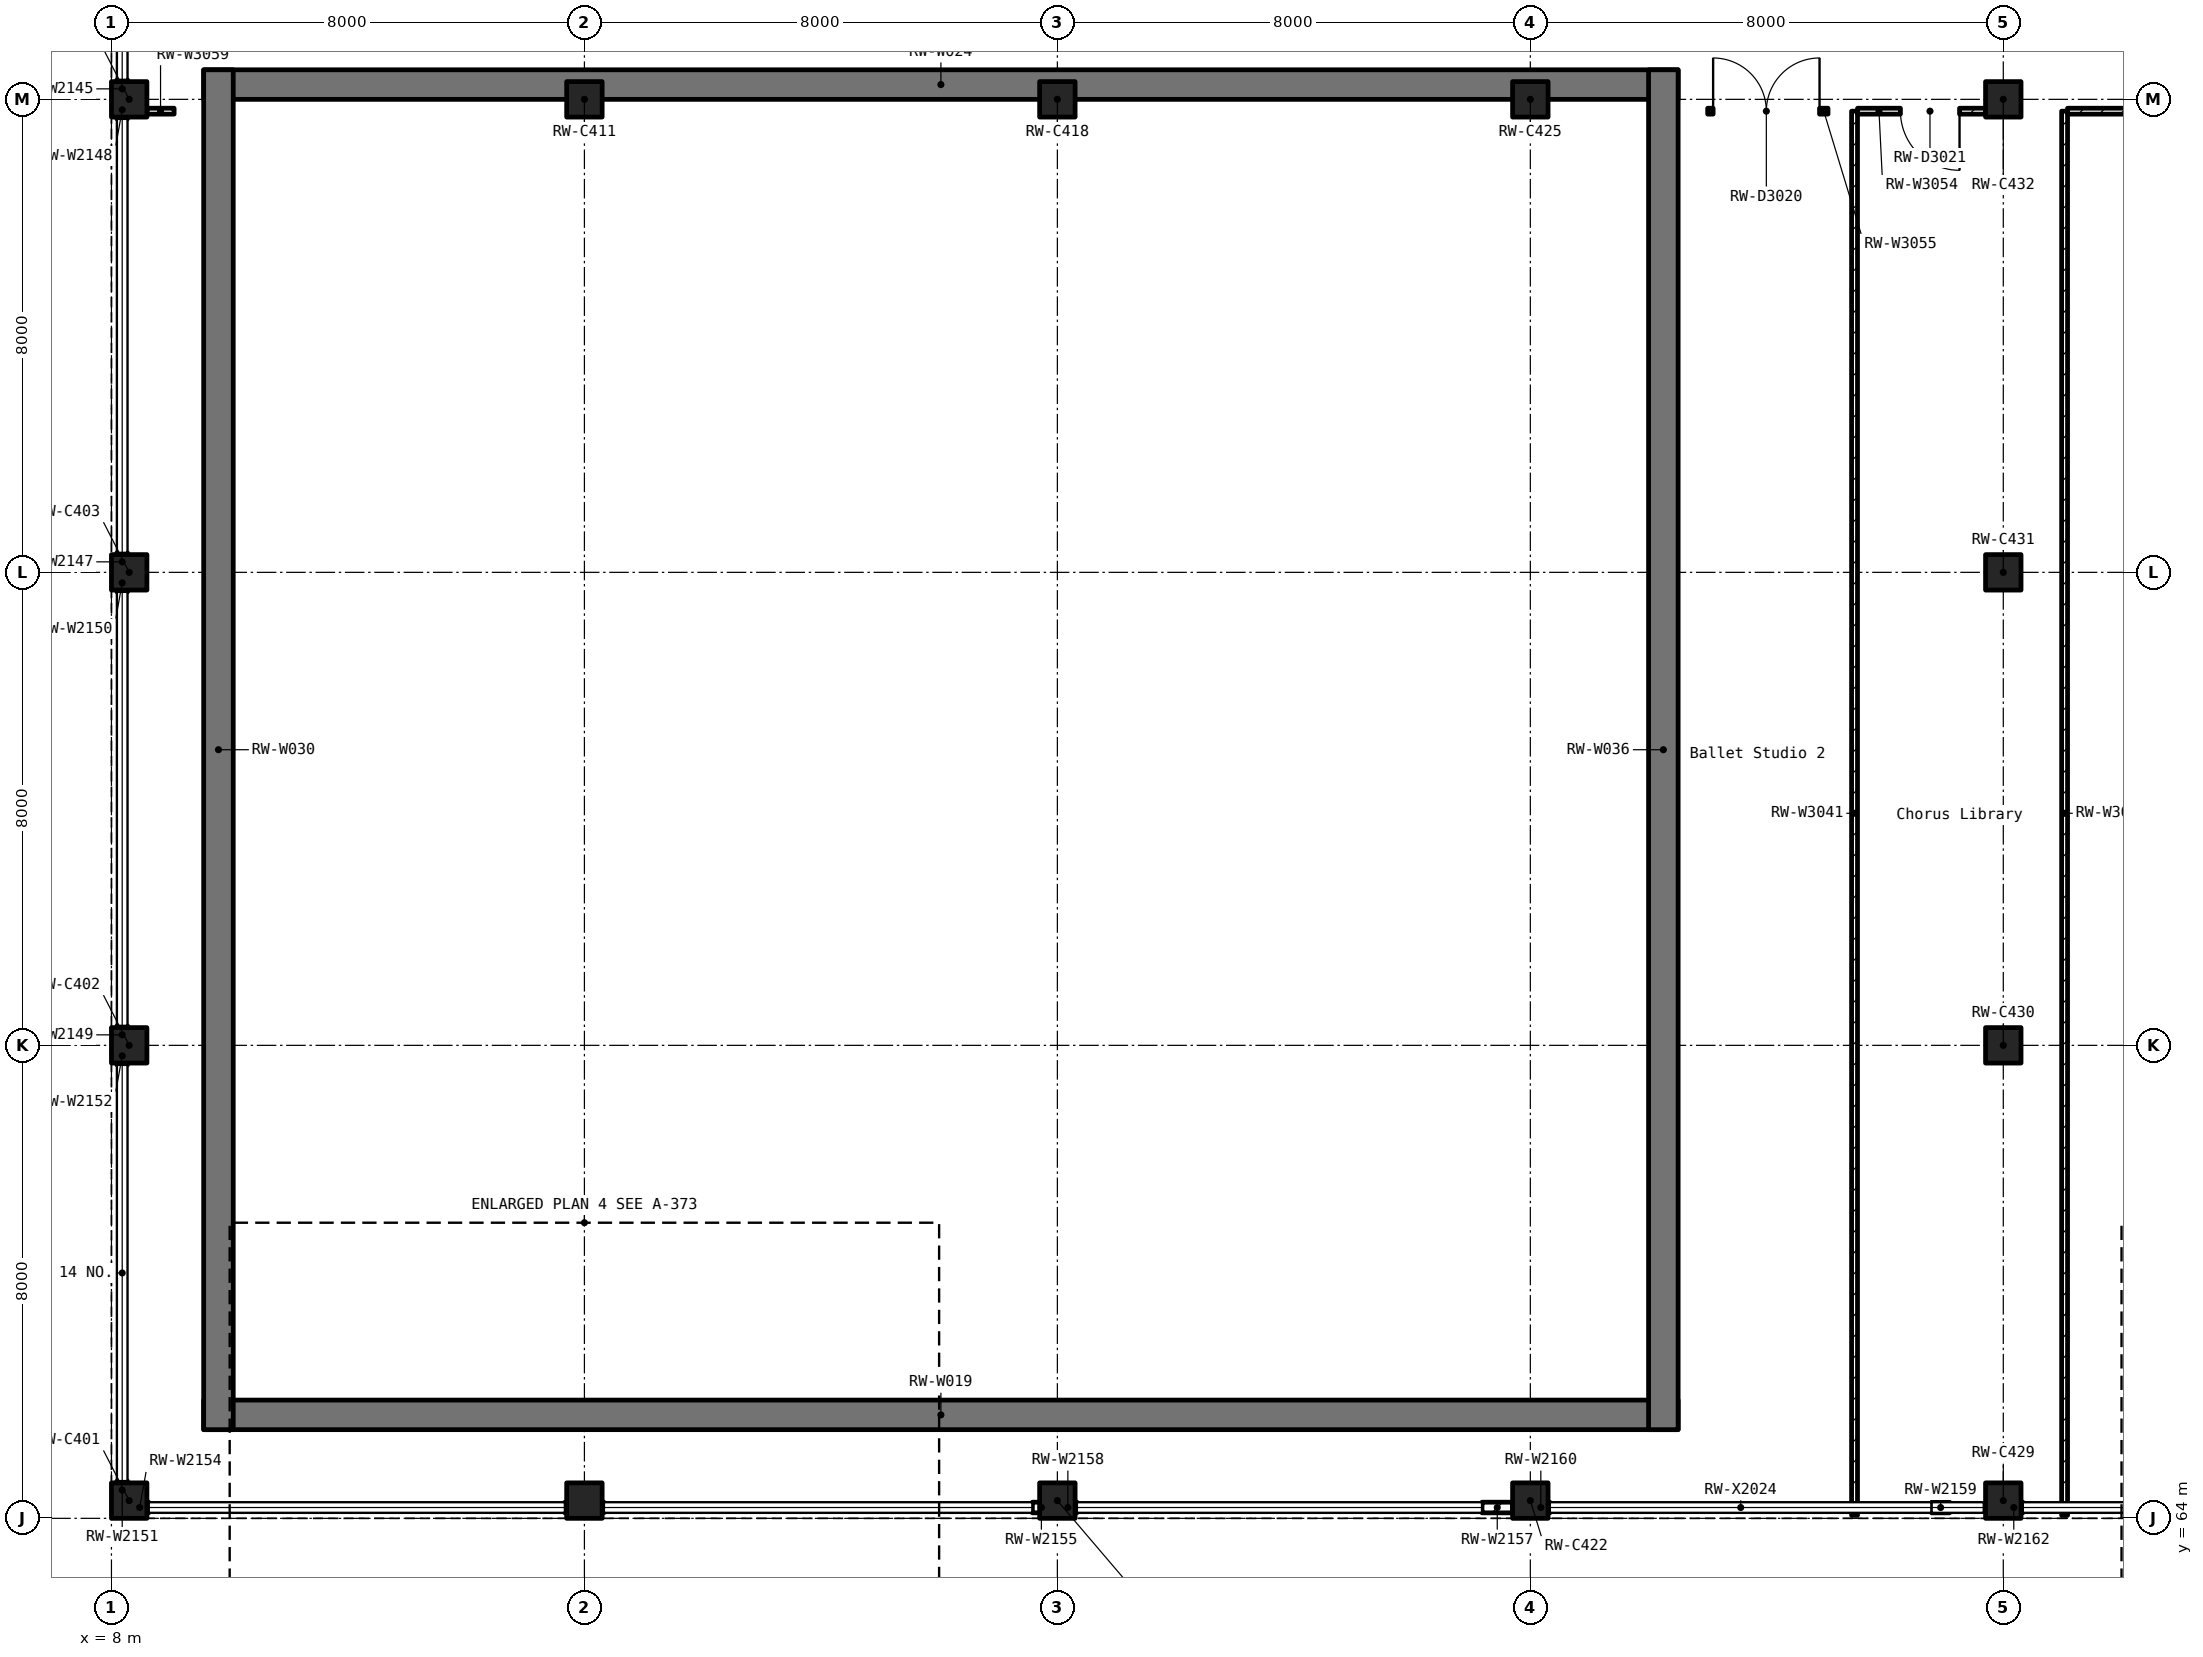
"""IFC4 building model, lengths in metres.
Left out: names, types, materials, properties, quantities, classifications, styles, units other than length and angle.
Written with IfcOpenShell. Run it as: python <this file> out.ifc"""

import sys

from ifc_helpers import new_model, si_unit, direction, frame, frame_2d, origin, origin_2d, place, context, subcontext, project, spatial, rectangle, extrude, element, fill, save


model = new_model("IFC4")
c1 = context("Model", 3, precision=1e-05, world=origin(), true_north=direction((0.0, 1.0)))
c2 = subcontext(c1, "Body", "Model", "MODEL_VIEW")
j1 = project(units=[si_unit("LENGTHUNIT", "METRE"), si_unit("PLANEANGLEUNIT", "RADIAN")], contexts=[c1])
p1 = place(None, origin())
s1 = spatial("IfcSite", under=j1, at=p1, CompositionType="ELEMENT")
p2 = place(p1, origin())
s2 = spatial("IfcBuilding", under=s1, at=p2, CompositionType="ELEMENT")
p3 = place(p2, frame((0.0, 0.0, 6.0)))
s3 = spatial("IfcBuildingStorey", under=s2, at=p3, CompositionType="ELEMENT", Elevation=6.0)
for number, where, z_axis, x_axis in (
    (1, (8.3, 64.3, 0.0), (0.0, 0.0, 1.0), (1.0, 0.0, 0.0)),
    (2, (8.3, 72.0, 0.0), (0.0, 0.0, 1.0), (1.0, 0.0, 0.0)),
    (3, (8.3, 80.0, 0.0), (0.0, 0.0, 1.0), (1.0, 0.0, 0.0)),
    (4, (8.3, 88.0, 0.0), (0.0, 0.0, 1.0), (1.0, 0.0, 0.0)),
    (5, (16.0, 64.3, 0.0), (0.0, 0.0, 1.0), (1.0, 0.0, 0.0)),
    (6, (16.0, 88.0, 0.0), (0.0, 0.0, 1.0), (1.0, 0.0, 0.0)),
    (7, (24.0, 64.3, 0.0), (0.0, 0.0, 1.0), (1.0, 0.0, 0.0)),
    (8, (24.0, 88.0, 0.0), (0.0, 0.0, 1.0), (1.0, 0.0, 0.0)),
    (9, (32.0, 64.3, 0.0), (0.0, 0.0, 1.0), (1.0, 0.0, 0.0)),
    (10, (32.0, 88.0, 0.0), (0.0, 0.0, 1.0), (1.0, 0.0, 0.0)),
    (11, (40.0, 64.3, 0.0), (0.0, 0.0, 1.0), (1.0, 0.0, 0.0)),
    (12, (40.0, 72.0, 0.0), (0.0, 0.0, 1.0), (1.0, 0.0, 0.0)),
    (13, (40.0, 80.0, 0.0), (0.0, 0.0, 1.0), (1.0, 0.0, 0.0)),
    (14, (40.0, 88.0, 0.0), (0.0, 0.0, 1.0), (1.0, 0.0, 0.0)),
):
    element("IfcColumn", number, at=place(p3, frame(where, z_axis=z_axis, x_axis=x_axis)), inside=s3, PredefinedType="COLUMN", context=c2, shape_type="SweptSolid", body=[
        extrude(rectangle(XDim=0.6, YDim=0.6, at=origin_2d()), origin(), (0.0, 0.0, 1.0), 5.5),
    ])
for number, where, z_axis, x_axis in (
    (15, (9.56, 65.75, 0.0), (0.0, 0.0, 1.0), (1.0, 0.0, 0.0)),
    (16, (9.56, 88.25, 0.0), (0.0, 0.0, 1.0), (1.0, 0.0, 0.0)),
):
    element("IfcWall", number, at=place(p3, frame(where, z_axis=z_axis, x_axis=x_axis)), inside=s3, PredefinedType="SHEAR", context=c2, shape_type="SweptSolid", body=[
        extrude(rectangle(XDim=24.94, YDim=0.5, at=frame_2d((12.47, 0.0))), origin(), (0.0, 0.0, 1.0), 5.5),
    ])
for number, where, z_axis, x_axis in (
    (17, (9.81, 65.5, 0.0), (0.0, 0.0, 1.0), (0.0, 1.0, 0.0)),
    (18, (34.25, 65.5, 0.0), (0.0, 0.0, 1.0), (0.0, 1.0, 0.0)),
):
    element("IfcWall", number, at=place(p3, frame(where, z_axis=z_axis, x_axis=x_axis)), inside=s3, PredefinedType="SHEAR", context=c2, shape_type="SweptSolid", body=[
        extrude(rectangle(XDim=23.0, YDim=0.5, at=frame_2d((11.5, 0.0))), origin(), (0.0, 0.0, 1.0), 5.5),
    ])
for number, where, z_axis, x_axis in (
    (19, (37.484, 87.8, 0.0), (0.0, 0.0, 1.0), (0.0, -1.0, 0.0)),
    (20, (41.037, 64.05, 0.0), (0.0, 0.0, 1.0), (0.0, 1.0, 0.0)),
):
    element("IfcWall", number, at=place(p3, frame(where, z_axis=z_axis, x_axis=x_axis)), inside=s3, PredefinedType="PARTITIONING", context=c2, shape_type="SweptSolid", body=[
        extrude(rectangle(XDim=23.75, YDim=0.1, at=frame_2d((11.875, 0.0))), origin(), (0.0, 0.0, 1.0), 4.45),
    ])
p4 = place(p3, frame((41.087, 87.8, 0.0), z_axis=(0.0, 0.0, 1.0), x_axis=(1.0, 0.0, 0.0)))
e21 = element("IfcWall", 21, at=p4, inside=s3, PredefinedType="PARTITIONING", context=c2, shape_type="SweptSolid", body=[
    extrude(rectangle(XDim=6.613, YDim=0.1, at=frame_2d((3.307, 0.0))), origin(), (0.0, 0.0, 1.0), 4.45),
])
p5 = place(p4, frame((4.002, 0.0, 0.0)))
e22 = element("IfcOpeningElement", 22, at=p5, cuts=e21, PredefinedType="OPENING", context=c2, shape_type="SweptSolid", body=[
    extrude(rectangle(XDim=1.8, YDim=2.1, at=frame_2d((0.9, 1.05))), frame((0.0, 0.062, 0.0), z_axis=(0.0, -1.0, 0.0), x_axis=(1.0, 0.0, 0.0)), (0.0, 0.0, 1.0), 0.124),
])
p6 = place(p3, frame((39.7, 87.8, 0.0), z_axis=(0.0, 0.0, 1.0), x_axis=(-1.0, 0.0, 0.0)))
e23 = element("IfcWall", 23, at=p6, inside=s3, PredefinedType="PARTITIONING", context=c2, shape_type="SweptSolid", body=[
    extrude(rectangle(XDim=2.165, YDim=0.1, at=frame_2d((1.083, 0.0))), origin(), (0.0, 0.0, 1.0), 4.45),
])
p7 = place(p6, frame((0.44, 0.0, 0.0)))
e24 = element("IfcOpeningElement", 24, at=p7, cuts=e23, PredefinedType="OPENING", context=c2, shape_type="SweptSolid", body=[
    extrude(rectangle(XDim=1.0, YDim=2.1, at=frame_2d((0.5, 1.05))), frame((0.0, 0.062, 0.0), z_axis=(0.0, -1.0, 0.0), x_axis=(1.0, 0.0, 0.0)), (0.0, 0.0, 1.0), 0.124),
])
p8 = place(p3, frame((35.0, 87.8, 0.0), z_axis=(0.0, 0.0, 1.0), x_axis=(1.0, 0.0, 0.0)))
e25 = element("IfcWall", 25, at=p8, inside=s3, PredefinedType="PARTITIONING", context=c2, shape_type="SweptSolid", body=[
    extrude(rectangle(XDim=2.035, YDim=0.1, at=frame_2d((1.018, 0.0))), origin(), (0.0, 0.0, 1.0), 4.45),
])
p9 = place(p8, frame((0.092, 0.0, 0.0)))
e26 = element("IfcOpeningElement", 26, at=p9, cuts=e25, PredefinedType="OPENING", context=c2, shape_type="SweptSolid", body=[
    extrude(rectangle(XDim=1.8, YDim=2.1, at=frame_2d((0.9, 1.05))), frame((0.0, 0.062, 0.0), z_axis=(0.0, -1.0, 0.0), x_axis=(1.0, 0.0, 0.0)), (0.0, 0.0, 1.0), 0.124),
])
p10 = place(p3, frame((8.601, 87.8, 0.0), z_axis=(0.0, 0.0, 1.0), x_axis=(1.0, 0.0, 0.0)))
e27 = element("IfcWall", 27, at=p10, inside=s3, PredefinedType="PARTITIONING", context=c2, shape_type="SweptSolid", body=[
    extrude(rectangle(XDim=0.459, YDim=0.1, at=frame_2d((0.229, 0.0))), origin(), (0.0, 0.0, 1.0), 4.45),
])
for number, where, z_axis, x_axis in (
    (28, (8.182, 88.33, 0.0), (0.0, 0.0, 1.0), (0.0, -1.0, 0.0)),
    (29, (8.182, 80.33, 0.0), (0.0, 0.0, 1.0), (0.0, -1.0, 0.0)),
    (30, (8.182, 87.67, 0.0), (0.0, 0.0, 1.0), (0.0, 1.0, 0.0)),
    (31, (8.182, 72.33, 0.0), (0.0, 0.0, 1.0), (0.0, -1.0, 0.0)),
    (32, (8.182, 79.67, 0.0), (0.0, 0.0, 1.0), (0.0, 1.0, 0.0)),
):
    element("IfcWall", number, at=place(p3, frame(where, z_axis=z_axis, x_axis=x_axis)), inside=s3, PredefinedType="SOLIDWALL", context=c2, shape_type="SweptSolid", body=[
        extrude(rectangle(XDim=0.305, YDim=0.18, at=frame_2d((0.153, 0.0))), origin(), (0.0, 0.0, 1.0), 3.7),
    ])
p11 = place(p3, frame((8.182, 64.63, 0.0), z_axis=(0.0, 0.0, 1.0), x_axis=(0.0, -1.0, 0.0)))
e33 = element("IfcWall", 33, at=p11, inside=s3, PredefinedType="SOLIDWALL", context=c2, shape_type="SweptSolid", body=[
    extrude(rectangle(XDim=0.305, YDim=0.18, at=frame_2d((0.152, 0.0))), origin(), (0.0, 0.0, 1.0), 3.7),
])
for number, where, z_axis, x_axis in (
    (34, (8.182, 71.67, 0.0), (0.0, 0.0, 1.0), (0.0, 1.0, 0.0)),
    (35, (15.67, 64.183, 0.0), (0.0, 0.0, 1.0), (1.0, 0.0, 0.0)),
):
    element("IfcWall", number, at=place(p3, frame(where, z_axis=z_axis, x_axis=x_axis)), inside=s3, PredefinedType="SOLIDWALL", context=c2, shape_type="SweptSolid", body=[
        extrude(rectangle(XDim=0.305, YDim=0.18, at=frame_2d((0.153, 0.0))), origin(), (0.0, 0.0, 1.0), 3.7),
    ])
p12 = place(p3, frame((8.63, 64.183, 0.0), z_axis=(0.0, 0.0, 1.0), x_axis=(-1.0, 0.0, 0.0)))
e36 = element("IfcWall", 36, at=p12, inside=s3, PredefinedType="SOLIDWALL", context=c2, shape_type="SweptSolid", body=[
    extrude(rectangle(XDim=0.305, YDim=0.18, at=frame_2d((0.152, 0.0))), origin(), (0.0, 0.0, 1.0), 3.7),
])
for number, where, z_axis, x_axis in (
    (37, (23.577, 64.183, 0.0), (0.0, 0.0, 1.0), (1.0, 0.0, 0.0)),
    (38, (16.33, 64.183, 0.0), (0.0, 0.0, 1.0), (-1.0, 0.0, 0.0)),
):
    element("IfcWall", number, at=place(p3, frame(where, z_axis=z_axis, x_axis=x_axis)), inside=s3, PredefinedType="SOLIDWALL", context=c2, shape_type="SweptSolid", body=[
        extrude(rectangle(XDim=0.305, YDim=0.18, at=frame_2d((0.153, 0.0))), origin(), (0.0, 0.0, 1.0), 3.7),
    ])
p13 = place(p3, frame((31.183, 64.183, 0.0), z_axis=(0.0, 0.0, 1.0), x_axis=(1.0, 0.0, 0.0)))
e39 = element("IfcWall", 39, at=p13, inside=s3, PredefinedType="SOLIDWALL", context=c2, shape_type="SweptSolid", body=[
    extrude(rectangle(XDim=0.515, YDim=0.18, at=frame_2d((0.257, 0.0))), origin(), (0.0, 0.0, 1.0), 3.7),
])
p14 = place(p3, frame((24.33, 64.183, 0.0), z_axis=(0.0, 0.0, 1.0), x_axis=(-1.0, 0.0, 0.0)))
e40 = element("IfcWall", 40, at=p14, inside=s3, PredefinedType="SOLIDWALL", context=c2, shape_type="SweptSolid", body=[
    extrude(rectangle(XDim=0.305, YDim=0.18, at=frame_2d((0.153, 0.0))), origin(), (0.0, 0.0, 1.0), 3.7),
])
p15 = place(p3, frame((38.788, 64.183, 0.0), z_axis=(0.0, 0.0, 1.0), x_axis=(1.0, 0.0, 0.0)))
e41 = element("IfcWall", 41, at=p15, inside=s3, PredefinedType="SOLIDWALL", context=c2, shape_type="SweptSolid", body=[
    extrude(rectangle(XDim=0.305, YDim=0.18, at=frame_2d((0.152, 0.0))), origin(), (0.0, 0.0, 1.0), 3.7),
])
for number, where, z_axis, x_axis in (
    (42, (32.33, 64.183, 0.0), (0.0, 0.0, 1.0), (-1.0, 0.0, 0.0)),
    (43, (40.33, 64.183, 0.0), (0.0, 0.0, 1.0), (-1.0, 0.0, 0.0)),
):
    element("IfcWall", number, at=place(p3, frame(where, z_axis=z_axis, x_axis=x_axis)), inside=s3, PredefinedType="SOLIDWALL", context=c2, shape_type="SweptSolid", body=[
        extrude(rectangle(XDim=0.305, YDim=0.18, at=frame_2d((0.153, 0.0))), origin(), (0.0, 0.0, 1.0), 3.7),
    ])
p16 = place(p9, origin())
e44 = element("IfcDoor", 44, at=p16, inside=s3, OperationType="DOUBLE_DOOR_SINGLE_SWING", PredefinedType="DOOR", context=c2, shape_type="SweptSolid", body=[
    extrude(rectangle(XDim=1.8, YDim=2.1, at=frame_2d((0.9, 1.05))), frame((0.0, 0.025, 0.0), z_axis=(0.0, -1.0, 0.0), x_axis=(1.0, 0.0, 0.0)), (0.0, 0.0, 1.0), 0.05),
])
fill(e26, e44)
p17 = place(p7, origin())
e45 = element("IfcDoor", 45, at=p17, inside=s3, OperationType="SINGLE_SWING_LEFT", PredefinedType="DOOR", context=c2, shape_type="SweptSolid", body=[
    extrude(rectangle(XDim=1.0, YDim=2.1, at=frame_2d((0.5, 1.05))), frame((0.0, 0.025, 0.0), z_axis=(0.0, -1.0, 0.0), x_axis=(1.0, 0.0, 0.0)), (0.0, 0.0, 1.0), 0.05),
])
fill(e24, e45)
save(model, sys.argv[1])
